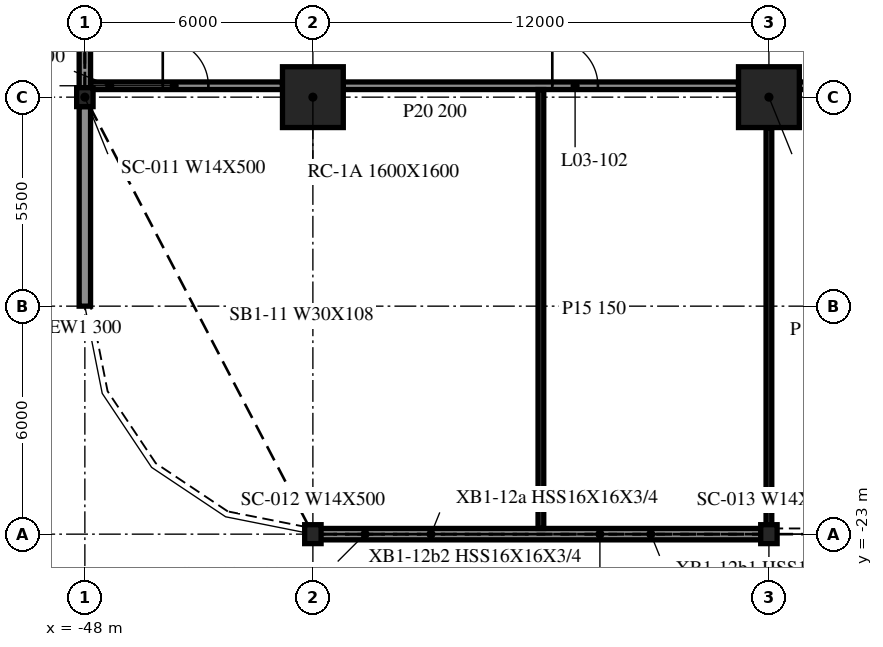
"""IFC4 building model, lengths in metres.
Left out: names, types, materials, properties, quantities, classifications, styles, units other than length and angle.
Written with IfcOpenShell. Run it as: python <this file> out.ifc"""

import sys

from ifc_helpers import new_model, si_unit, direction, frame, frame_2d, origin, origin_2d, place, context, subcontext, project, spatial, rectangle, i_section, extrude, element, fill, save


model = new_model("IFC4")
c1 = context("Model", 3, precision=1e-05, world=origin(), true_north=direction((0.0, 1.0)))
c2 = subcontext(c1, "Body", "Model", "MODEL_VIEW")
j1 = project(units=[si_unit("LENGTHUNIT", "METRE"), si_unit("PLANEANGLEUNIT", "RADIAN")], contexts=[c1])
p1 = place(None, origin())
s1 = spatial("IfcSite", under=j1, at=p1, CompositionType="ELEMENT")
p2 = place(p1, origin())
s2 = spatial("IfcBuilding", under=s1, at=p2, CompositionType="ELEMENT")
p3 = place(p2, frame((0.0, 0.0, 15.8)))
s3 = spatial("IfcBuildingStorey", under=s2, at=p3, CompositionType="ELEMENT", Elevation=15.8)
for number, where, z_axis, x_axis in (
    (1, (-42.0, -11.5, -0.34), (0.0, 0.0, 1.0), (1.0, 0.0, 0.0)),
    (2, (-30.0, -11.5, -0.34), (0.0, 0.0, 1.0), (1.0, 0.0, 0.0)),
):
    element("IfcColumn", number, at=place(p3, frame(where, z_axis=z_axis, x_axis=x_axis)), inside=s3, PredefinedType="COLUMN", context=c2, shape_type="SweptSolid", body=[
        extrude(rectangle(XDim=1.6, YDim=1.6, at=origin_2d()), origin(), (0.0, 0.0, 1.0), 4.3),
    ])
for number, where, z_axis, x_axis in (
    (3, (-48.0, -11.5, -0.34), (0.0, 0.0, 1.0), (1.0, 0.0, 0.0)),
    (4, (-42.0, -23.0, -0.34), (0.0, 0.0, 1.0), (1.0, 0.0, 0.0)),
    (5, (-30.0, -23.0, -0.34), (0.0, 0.0, 1.0), (1.0, 0.0, 0.0)),
):
    element("IfcColumn", number, at=place(p3, frame(where, z_axis=z_axis, x_axis=x_axis)), inside=s3, PredefinedType="COLUMN", context=c2, shape_type="SweptSolid", body=[
        extrude(i_section(OverallWidth=0.432, OverallDepth=0.498, WebThickness=0.056, FlangeThickness=0.089, at=origin_2d()), origin(), (0.0, 0.0, 1.0), 4.3),
    ])
p4 = place(p3, frame((-48.0, -0.249, 0.0), z_axis=(0.0, 0.0, 1.0), x_axis=(0.0, -1.0, 0.0)))
e6 = element("IfcWall", 6, at=p4, inside=s3, PredefinedType="NOTDEFINED", context=c2, shape_type="SweptSolid", body=[
    extrude(rectangle(XDim=11.002, YDim=0.3, at=frame_2d((5.501, 0.0))), origin(), (0.0, 0.0, 1.0), 3.203),
])
p5 = place(p3, frame((-48.0, -11.749, 0.0), z_axis=(0.0, 0.0, 1.0), x_axis=(0.0, -1.0, 0.0)))
e7 = element("IfcWall", 7, at=p5, inside=s3, PredefinedType="NOTDEFINED", context=c2, shape_type="SweptSolid", body=[
    extrude(rectangle(XDim=5.251, YDim=0.3, at=frame_2d((2.625, 0.0))), origin(), (0.0, 0.0, 1.0), 3.203),
])
p6 = place(p3, frame((-41.972, -23.0, 0.0), z_axis=(0.0, 0.0, 1.0), x_axis=(1.0, 0.0, 0.0)))
e8 = element("IfcWall", 8, at=p6, inside=s3, PredefinedType="NOTDEFINED", context=c2, shape_type="SweptSolid", body=[
    extrude(rectangle(XDim=11.944, YDim=0.3, at=frame_2d((5.972, 0.0))), origin(), (0.0, 0.0, 1.0), 3.203),
])
p7 = place(p3, frame((-47.85, -11.2, 0.0), z_axis=(0.0, 0.0, 1.0), x_axis=(1.0, 0.0, 0.0)))
e9 = element("IfcWall", 9, at=p7, inside=s3, PredefinedType="PARTITIONING", context=c2, shape_type="SweptSolid", body=[
    extrude(rectangle(XDim=5.05, YDim=0.2, at=frame_2d((2.525, 0.0))), origin(), (0.0, 0.0, 1.0), 3.96),
])
p8 = place(p7, frame((1.9, 0.0, 0.0)))
e10 = element("IfcOpeningElement", 10, at=p8, cuts=e9, PredefinedType="OPENING", context=c2, shape_type="SweptSolid", body=[
    extrude(rectangle(XDim=1.2, YDim=2.1, at=frame_2d((0.6, 1.05))), frame((0.0, 0.11, 0.0), z_axis=(0.0, -1.0, 0.0), x_axis=(1.0, 0.0, 0.0)), (0.0, 0.0, 1.0), 0.22),
])
p9 = place(p3, frame((-41.2, -11.2, 0.0), z_axis=(0.0, 0.0, 1.0), x_axis=(1.0, 0.0, 0.0)))
e11 = element("IfcWall", 11, at=p9, inside=s3, PredefinedType="PARTITIONING", context=c2, shape_type="SweptSolid", body=[
    extrude(rectangle(XDim=10.4, YDim=0.2, at=frame_2d((5.2, 0.0))), origin(), (0.0, 0.0, 1.0), 3.96),
])
p10 = place(p9, frame((5.5, 0.0, 0.0)))
e12 = element("IfcOpeningElement", 12, at=p10, cuts=e11, PredefinedType="OPENING", context=c2, shape_type="SweptSolid", body=[
    extrude(rectangle(XDim=1.2, YDim=2.1, at=frame_2d((0.6, 1.05))), frame((0.0, 0.11, 0.0), z_axis=(0.0, -1.0, 0.0), x_axis=(1.0, 0.0, 0.0)), (0.0, 0.0, 1.0), 0.22),
])
p11 = place(p3, frame((-29.2, -11.2, 0.0), z_axis=(0.0, 0.0, 1.0), x_axis=(1.0, 0.0, 0.0)))
e13 = element("IfcWall", 13, at=p11, inside=s3, PredefinedType="PARTITIONING", context=c2, shape_type="SweptSolid", body=[
    extrude(rectangle(XDim=10.4, YDim=0.2, at=frame_2d((5.2, 0.0))), origin(), (0.0, 0.0, 1.0), 3.96),
])
p12 = place(p11, frame((3.7, 0.0, 0.0)))
e14 = element("IfcOpeningElement", 14, at=p12, cuts=e13, PredefinedType="OPENING", context=c2, shape_type="SweptSolid", body=[
    extrude(rectangle(XDim=1.2, YDim=2.1, at=frame_2d((0.6, 1.05))), frame((0.0, 0.11, 0.0), z_axis=(0.0, -1.0, 0.0), x_axis=(1.0, 0.0, 0.0)), (0.0, 0.0, 1.0), 0.22),
])
p13 = place(p11, frame((5.5, 0.0, 0.0)))
e15 = element("IfcOpeningElement", 15, at=p13, cuts=e13, PredefinedType="OPENING", context=c2, shape_type="SweptSolid", body=[
    extrude(rectangle(XDim=1.2, YDim=2.1, at=frame_2d((0.6, 1.05))), frame((0.0, 0.11, 0.0), z_axis=(0.0, -1.0, 0.0), x_axis=(1.0, 0.0, 0.0)), (0.0, 0.0, 1.0), 0.22),
])
p14 = place(p11, frame((8.5, 0.0, 0.0)))
e16 = element("IfcOpeningElement", 16, at=p14, cuts=e13, PredefinedType="OPENING", context=c2, shape_type="SweptSolid", body=[
    extrude(rectangle(XDim=1.0, YDim=2.1, at=frame_2d((0.5, 1.05))), frame((0.0, 0.11, 0.0), z_axis=(0.0, -1.0, 0.0), x_axis=(1.0, 0.0, 0.0)), (0.0, 0.0, 1.0), 0.22),
])
p15 = place(p3, frame((-36.0, -22.85, 0.0), z_axis=(0.0, 0.0, 1.0), x_axis=(0.0, 1.0, 0.0)))
e17 = element("IfcWall", 17, at=p15, inside=s3, PredefinedType="PARTITIONING", context=c2, shape_type="SweptSolid", body=[
    extrude(rectangle(XDim=11.55, YDim=0.15, at=frame_2d((5.775, 0.0))), origin(), (0.0, 0.0, 1.0), 3.96),
])
p16 = place(p3, frame((-30.0, -22.975, 0.0), z_axis=(0.0, 0.0, 1.0), x_axis=(0.0, 1.0, 0.0)))
e18 = element("IfcWall", 18, at=p16, inside=s3, PredefinedType="PARTITIONING", context=c2, shape_type="SweptSolid", body=[
    extrude(rectangle(XDim=10.675, YDim=0.15, at=frame_2d((5.337, 0.0))), origin(), (0.0, 0.0, 1.0), 3.96),
])
p17 = place(p8, origin())
e19 = element("IfcDoor", 19, at=p17, inside=s3, OperationType="SINGLE_SWING_RIGHT", PredefinedType="DOOR", context=c2, shape_type="SweptSolid", body=[
    extrude(rectangle(XDim=1.2, YDim=2.1, at=frame_2d((0.6, 1.05))), frame((0.0, 0.025, 0.0), z_axis=(0.0, -1.0, 0.0), x_axis=(1.0, 0.0, 0.0)), (0.0, 0.0, 1.0), 0.05),
])
fill(e10, e19)
p18 = place(p10, origin())
e20 = element("IfcDoor", 20, at=p18, inside=s3, OperationType="SINGLE_SWING_LEFT", PredefinedType="DOOR", context=c2, shape_type="SweptSolid", body=[
    extrude(rectangle(XDim=1.2, YDim=2.1, at=frame_2d((0.6, 1.05))), frame((0.0, 0.025, 0.0), z_axis=(0.0, -1.0, 0.0), x_axis=(1.0, 0.0, 0.0)), (0.0, 0.0, 1.0), 0.05),
])
fill(e12, e20)
save(model, sys.argv[1])
